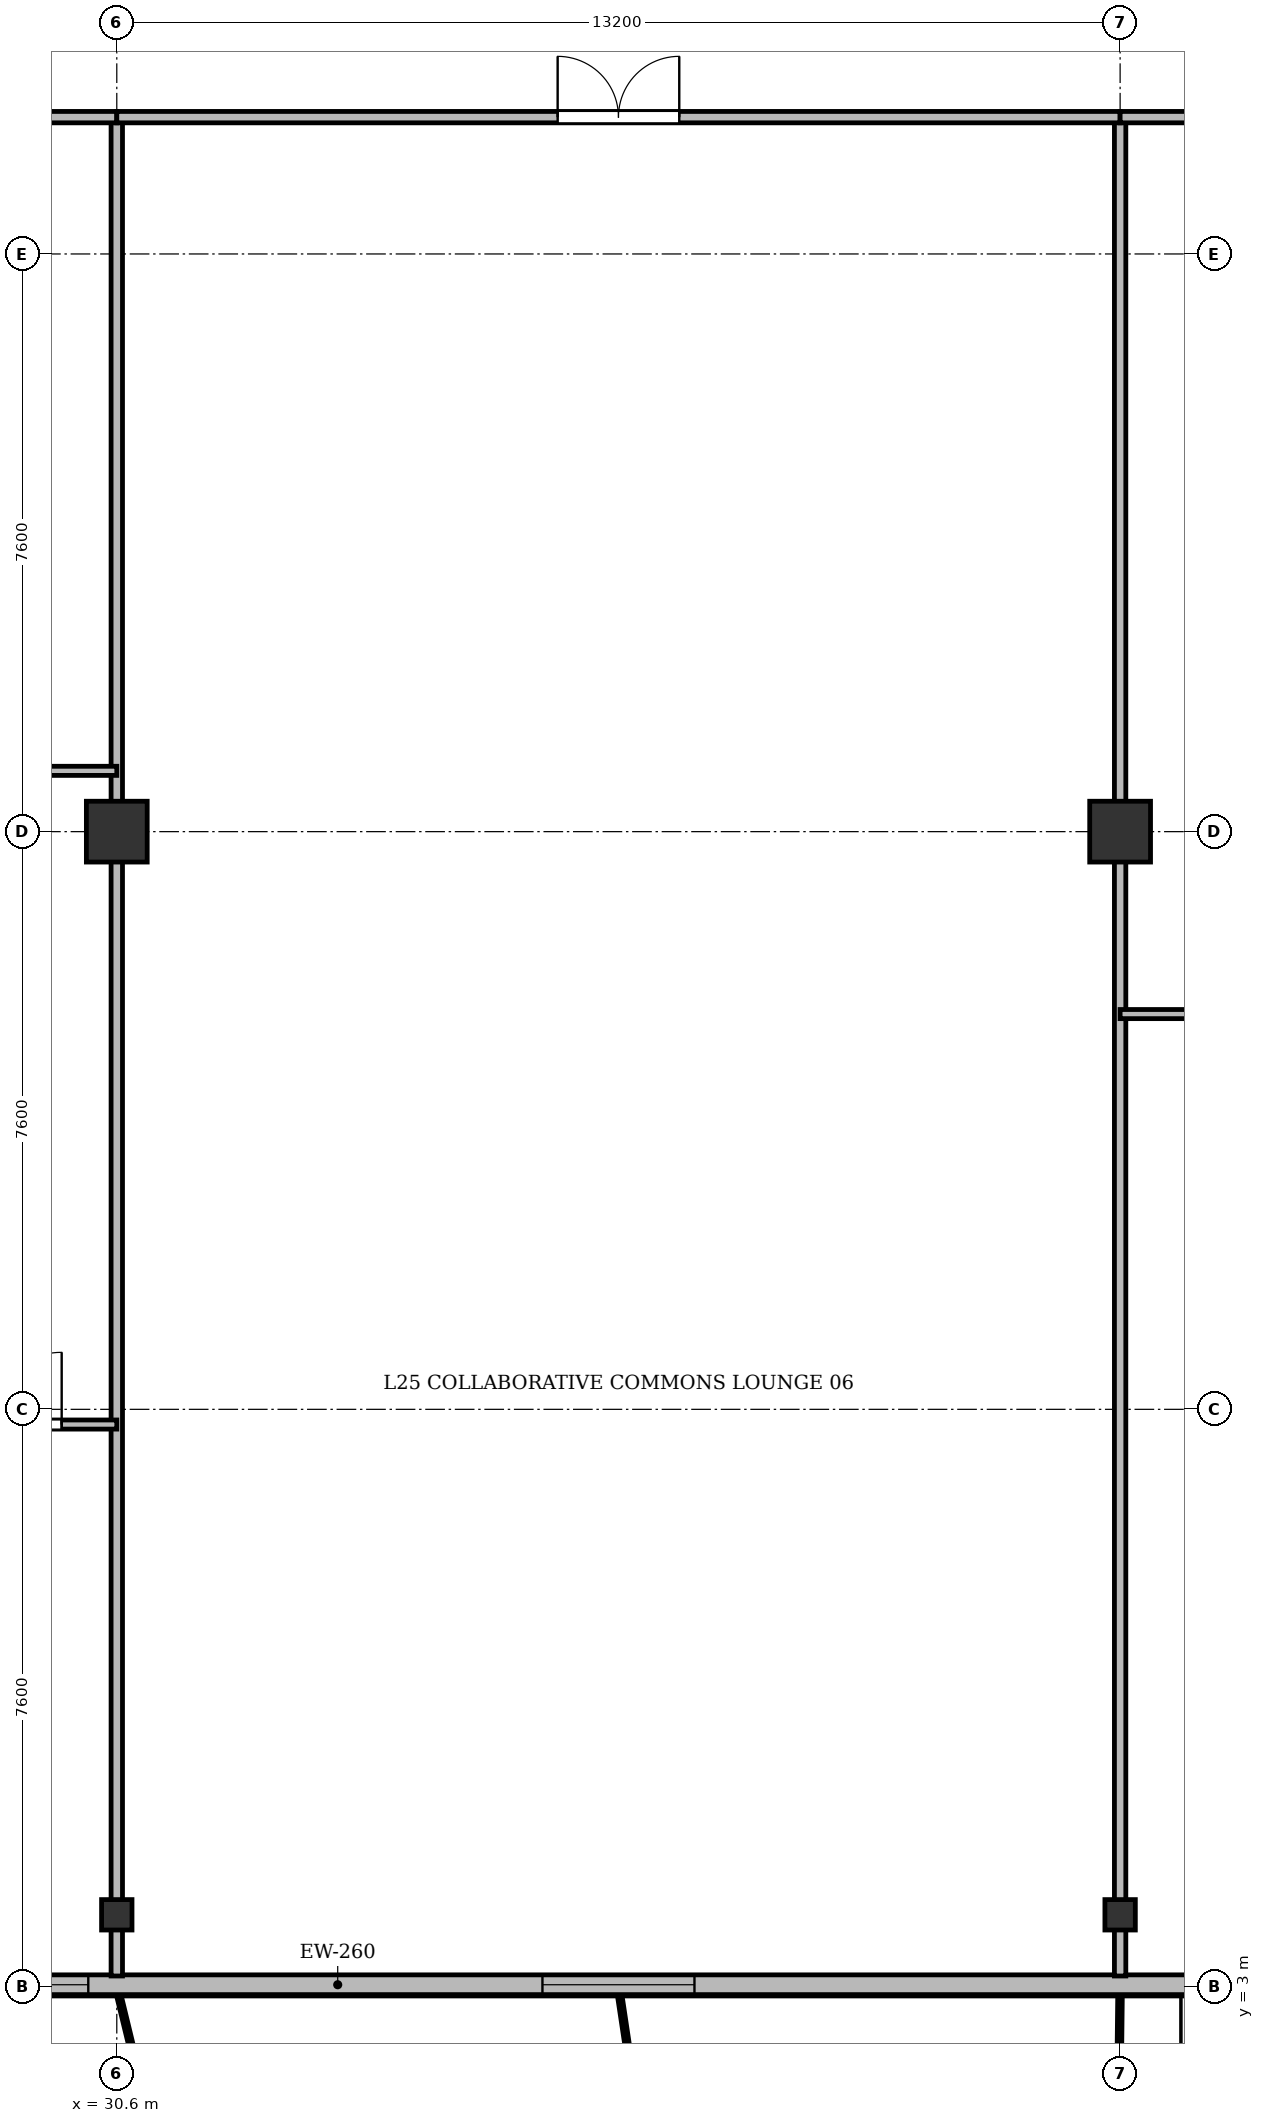
"""IFC4 building model, lengths in metres.
Left out: names, types, materials, properties, quantities, classifications, styles, units other than length and angle.
Written with IfcOpenShell. Run it as: python <this file> out.ifc"""

import sys

from ifc_helpers import new_model, si_unit, direction, frame, frame_2d, origin, origin_2d, place, context, subcontext, project, spatial, rectangle, i_section, extrude, source, transform, mapped, element, fill, save


model = new_model("IFC4")
c1 = context("Model", 3, precision=1e-05, world=origin(), true_north=direction((0.0, 1.0)))
c2 = subcontext(c1, "Body", "Model", "MODEL_VIEW")
j1 = project(units=[si_unit("LENGTHUNIT", "METRE"), si_unit("PLANEANGLEUNIT", "RADIAN")], contexts=[c1])
p1 = place(None, origin())
s1 = spatial("IfcSite", under=j1, at=p1, CompositionType="ELEMENT")
p2 = place(p1, origin())
s2 = spatial("IfcBuilding", under=s1, at=p2, CompositionType="ELEMENT")
p3 = place(p2, frame((0.0, 0.0, 99.7)))
s3 = spatial("IfcBuildingStorey", under=s2, at=p3, CompositionType="ELEMENT", Elevation=99.7)
m1 = source(origin(), c2, "Body", "SweptSolid", [
    extrude(i_section(OverallWidth=0.4, OverallDepth=0.4, WebThickness=0.022, FlangeThickness=0.035, at=origin_2d()), origin(), (0.0, 0.0, 1.0), 3.6),
])
p4 = place(p3, frame((30.6, 3.95, 0.0), z_axis=(0.0, 0.0, 1.0), x_axis=(1.0, 0.0, 0.0)))
e1 = element("IfcColumn", 1, at=p4, inside=s3, PredefinedType="COLUMN", context=c2, shape_type="MappedRepresentation", body=[
    mapped(m1, transform((0.0, 0.0, 0.0), x_axis=(1.0, 0.0, 0.0), y_axis=(0.0, 1.0, 0.0), z_axis=(0.0, 0.0, 1.0), scale=1.0)),
])
m2 = source(origin(), c2, "Body", "SweptSolid", [
    extrude(rectangle(XDim=0.8, YDim=0.8, at=origin_2d()), origin(), (0.0, 0.0, 1.0), 3.6),
])
p5 = place(p3, frame((30.6, 18.2, 0.0), z_axis=(0.0, 0.0, 1.0), x_axis=(1.0, 0.0, 0.0)))
e2 = element("IfcColumn", 2, at=p5, inside=s3, PredefinedType="COLUMN", context=c2, shape_type="MappedRepresentation", body=[
    mapped(m2, transform((0.0, 0.0, 0.0), x_axis=(1.0, 0.0, 0.0), y_axis=(0.0, 1.0, 0.0), z_axis=(0.0, 0.0, 1.0), scale=1.0)),
])
p6 = place(p3, frame((43.8, 3.95, 0.0), z_axis=(0.0, 0.0, 1.0), x_axis=(1.0, 0.0, 0.0)))
e3 = element("IfcColumn", 3, at=p6, inside=s3, PredefinedType="COLUMN", context=c2, shape_type="MappedRepresentation", body=[
    mapped(m1, transform((0.0, 0.0, 0.0), x_axis=(1.0, 0.0, 0.0), y_axis=(0.0, 1.0, 0.0), z_axis=(0.0, 0.0, 1.0), scale=1.0)),
])
p7 = place(p3, frame((43.8, 18.2, 0.0), z_axis=(0.0, 0.0, 1.0), x_axis=(1.0, 0.0, 0.0)))
e4 = element("IfcColumn", 4, at=p7, inside=s3, PredefinedType="COLUMN", context=c2, shape_type="MappedRepresentation", body=[
    mapped(m2, transform((0.0, 0.0, 0.0), x_axis=(1.0, 0.0, 0.0), y_axis=(0.0, 1.0, 0.0), z_axis=(0.0, 0.0, 1.0), scale=1.0)),
])
p8 = place(p3, frame((66.9, 3.03, 0.0), z_axis=(0.0, 0.0, 1.0), x_axis=(-1.0, 0.0, 0.0)))
e5 = element("IfcWall", 5, at=p8, inside=s3, PredefinedType="SOLIDWALL", context=c2, shape_type="SweptSolid", body=[
    extrude(rectangle(XDim=59.4, YDim=0.26, at=frame_2d((29.7, 0.0))), origin(), (0.0, 0.0, 1.0), 3.34),
])
p9 = place(p8, frame((1.9, 0.0, 0.9)))
e6 = element("IfcOpeningElement", 6, at=p9, cuts=e5, PredefinedType="OPENING", context=c2, shape_type="SweptSolid", body=[
    extrude(rectangle(XDim=2.2, YDim=1.8, at=frame_2d((1.1, 0.9))), frame((0.0, 0.14, 0.0), z_axis=(0.0, -1.0, 0.0), x_axis=(1.0, 0.0, 0.0)), (0.0, 0.0, 1.0), 0.28),
])
p10 = place(p8, frame((5.65, 0.0, 0.9)))
e7 = element("IfcOpeningElement", 7, at=p10, cuts=e5, PredefinedType="OPENING", context=c2, shape_type="SweptSolid", body=[
    extrude(rectangle(XDim=1.5, YDim=1.75, at=frame_2d((0.75, 0.875))), frame((0.0, 0.14, 0.0), z_axis=(0.0, -1.0, 0.0), x_axis=(1.0, 0.0, 0.0)), (0.0, 0.0, 1.0), 0.28),
])
p11 = place(p8, frame((8.4, 0.0, 0.9)))
e8 = element("IfcOpeningElement", 8, at=p11, cuts=e5, PredefinedType="OPENING", context=c2, shape_type="SweptSolid", body=[
    extrude(rectangle(XDim=2.0, YDim=1.95, at=frame_2d((1.0, 0.975))), frame((0.0, 0.14, 0.0), z_axis=(0.0, -1.0, 0.0), x_axis=(1.0, 0.0, 0.0)), (0.0, 0.0, 1.0), 0.28),
])
p12 = place(p8, frame((11.175, 0.0, 0.9)))
e9 = element("IfcOpeningElement", 9, at=p12, cuts=e5, PredefinedType="OPENING", context=c2, shape_type="SweptSolid", body=[
    extrude(rectangle(XDim=1.65, YDim=1.85, at=frame_2d((0.825, 0.925))), frame((0.0, 0.14, 0.0), z_axis=(0.0, -1.0, 0.0), x_axis=(1.0, 0.0, 0.0)), (0.0, 0.0, 1.0), 0.28),
])
p13 = place(p8, frame((13.7, 0.0, 0.9)))
e10 = element("IfcOpeningElement", 10, at=p13, cuts=e5, PredefinedType="OPENING", context=c2, shape_type="SweptSolid", body=[
    extrude(rectangle(XDim=1.8, YDim=1.8, at=frame_2d((0.9, 0.9))), frame((0.0, 0.14, 0.0), z_axis=(0.0, -1.0, 0.0), x_axis=(1.0, 0.0, 0.0)), (0.0, 0.0, 1.0), 0.28),
])
p14 = place(p8, frame((16.5, 0.0, 0.9)))
e11 = element("IfcOpeningElement", 11, at=p14, cuts=e5, PredefinedType="OPENING", context=c2, shape_type="SweptSolid", body=[
    extrude(rectangle(XDim=2.2, YDim=1.8, at=frame_2d((1.1, 0.9))), frame((0.0, 0.14, 0.0), z_axis=(0.0, -1.0, 0.0), x_axis=(1.0, 0.0, 0.0)), (0.0, 0.0, 1.0), 0.28),
])
p15 = place(p8, frame((20.227, 0.0, 0.0)))
e12 = element("IfcOpeningElement", 12, at=p15, cuts=e5, PredefinedType="OPENING", context=c2, shape_type="SweptSolid", body=[
    extrude(rectangle(XDim=1.2, YDim=2.2, at=frame_2d((0.6, 1.1))), frame((0.0, 0.14, 0.0), z_axis=(0.0, -1.0, 0.0), x_axis=(1.0, 0.0, 0.0)), (0.0, 0.0, 1.0), 0.28),
])
p16 = place(p8, frame((28.7, 0.0, 0.9)))
e13 = element("IfcOpeningElement", 13, at=p16, cuts=e5, PredefinedType="OPENING", context=c2, shape_type="SweptSolid", body=[
    extrude(rectangle(XDim=2.0, YDim=1.95, at=frame_2d((1.0, 0.975))), frame((0.0, 0.14, 0.0), z_axis=(0.0, -1.0, 0.0), x_axis=(1.0, 0.0, 0.0)), (0.0, 0.0, 1.0), 0.28),
])
p17 = place(p8, frame((36.675, 0.0, 0.9)))
e14 = element("IfcOpeningElement", 14, at=p17, cuts=e5, PredefinedType="OPENING", context=c2, shape_type="SweptSolid", body=[
    extrude(rectangle(XDim=1.65, YDim=1.85, at=frame_2d((0.825, 0.925))), frame((0.0, 0.14, 0.0), z_axis=(0.0, -1.0, 0.0), x_axis=(1.0, 0.0, 0.0)), (0.0, 0.0, 1.0), 0.28),
])
p18 = place(p8, frame((39.0, 0.0, 0.9)))
e15 = element("IfcOpeningElement", 15, at=p18, cuts=e5, PredefinedType="OPENING", context=c2, shape_type="SweptSolid", body=[
    extrude(rectangle(XDim=1.8, YDim=1.8, at=frame_2d((0.9, 0.9))), frame((0.0, 0.14, 0.0), z_axis=(0.0, -1.0, 0.0), x_axis=(1.0, 0.0, 0.0)), (0.0, 0.0, 1.0), 0.28),
])
p19 = place(p8, frame((41.55, 0.0, 0.9)))
e16 = element("IfcOpeningElement", 16, at=p19, cuts=e5, PredefinedType="OPENING", context=c2, shape_type="SweptSolid", body=[
    extrude(rectangle(XDim=1.5, YDim=1.75, at=frame_2d((0.75, 0.875))), frame((0.0, 0.14, 0.0), z_axis=(0.0, -1.0, 0.0), x_axis=(1.0, 0.0, 0.0)), (0.0, 0.0, 1.0), 0.28),
])
p20 = place(p8, frame((45.36, 0.0, 0.0)))
e17 = element("IfcOpeningElement", 17, at=p20, cuts=e5, PredefinedType="OPENING", context=c2, shape_type="SweptSolid", body=[
    extrude(rectangle(XDim=1.2, YDim=2.2, at=frame_2d((0.6, 1.1))), frame((0.0, 0.14, 0.0), z_axis=(0.0, -1.0, 0.0), x_axis=(1.0, 0.0, 0.0)), (0.0, 0.0, 1.0), 0.28),
])
p21 = place(p8, frame((48.3, 0.0, 0.9)))
e18 = element("IfcOpeningElement", 18, at=p21, cuts=e5, PredefinedType="OPENING", context=c2, shape_type="SweptSolid", body=[
    extrude(rectangle(XDim=2.0, YDim=1.95, at=frame_2d((1.0, 0.975))), frame((0.0, 0.14, 0.0), z_axis=(0.0, -1.0, 0.0), x_axis=(1.0, 0.0, 0.0)), (0.0, 0.0, 1.0), 0.28),
])
p22 = place(p8, frame((52.175, 0.0, 0.9)))
e19 = element("IfcOpeningElement", 19, at=p22, cuts=e5, PredefinedType="OPENING", context=c2, shape_type="SweptSolid", body=[
    extrude(rectangle(XDim=1.65, YDim=1.85, at=frame_2d((0.825, 0.925))), frame((0.0, 0.14, 0.0), z_axis=(0.0, -1.0, 0.0), x_axis=(1.0, 0.0, 0.0)), (0.0, 0.0, 1.0), 0.28),
])
p23 = place(p8, frame((55.5, 0.0, 0.9)))
e20 = element("IfcOpeningElement", 20, at=p23, cuts=e5, PredefinedType="OPENING", context=c2, shape_type="SweptSolid", body=[
    extrude(rectangle(XDim=1.8, YDim=1.8, at=frame_2d((0.9, 0.9))), frame((0.0, 0.14, 0.0), z_axis=(0.0, -1.0, 0.0), x_axis=(1.0, 0.0, 0.0)), (0.0, 0.0, 1.0), 0.28),
])
for number, where, z_axis, x_axis in (
    (21, (30.6, 3.145, 0.0), (0.0, 0.0, 1.0), (0.0, 1.0, 0.0)),
    (22, (43.8, 3.145, 0.0), (0.0, 0.0, 1.0), (0.0, 1.0, 0.0)),
):
    element("IfcWall", number, at=place(p3, frame(where, z_axis=z_axis, x_axis=x_axis)), inside=s3, PredefinedType="PARTITIONING", context=c2, shape_type="SweptSolid", body=[
        extrude(rectangle(XDim=24.455, YDim=0.15, at=frame_2d((12.228, 0.0))), origin(), (0.0, 0.0, 1.0), 2.84),
    ])
p24 = place(p3, frame((23.4, 19.0, 0.0), z_axis=(0.0, 0.0, 1.0), x_axis=(1.0, 0.0, 0.0)))
e23 = element("IfcWall", 23, at=p24, inside=s3, PredefinedType="PARTITIONING", context=c2, shape_type="SweptSolid", body=[
    extrude(rectangle(XDim=7.2, YDim=0.12, at=frame_2d((3.6, 0.0))), origin(), (0.0, 0.0, 1.0), 2.84),
])
p25 = place(p24, frame((3.125, 0.0, 0.0)))
e24 = element("IfcOpeningElement", 24, at=p25, cuts=e23, PredefinedType="OPENING", context=c2, shape_type="SweptSolid", body=[
    extrude(rectangle(XDim=0.95, YDim=2.15, at=frame_2d((0.475, 1.075))), frame((0.0, 0.07, 0.0), z_axis=(0.0, -1.0, 0.0), x_axis=(1.0, 0.0, 0.0)), (0.0, 0.0, 1.0), 0.14),
])
p26 = place(p3, frame((23.4, 27.6, 0.0), z_axis=(0.0, 0.0, 1.0), x_axis=(1.0, 0.0, 0.0)))
e25 = element("IfcWall", 25, at=p26, inside=s3, PredefinedType="PARTITIONING", context=c2, shape_type="SweptSolid", body=[
    extrude(rectangle(XDim=7.2, YDim=0.15, at=frame_2d((3.6, 0.0))), origin(), (0.0, 0.0, 1.0), 2.84),
])
p27 = place(p26, frame((4.706, 0.0, 0.0)))
e26 = element("IfcOpeningElement", 26, at=p27, cuts=e25, PredefinedType="OPENING", context=c2, shape_type="SweptSolid", body=[
    extrude(rectangle(XDim=0.95, YDim=2.15, at=frame_2d((0.475, 1.075))), frame((0.0, 0.085, 0.0), z_axis=(0.0, -1.0, 0.0), x_axis=(1.0, 0.0, 0.0)), (0.0, 0.0, 1.0), 0.17),
])
p28 = place(p3, frame((28.2, 10.4, 0.0), z_axis=(0.0, 0.0, 1.0), x_axis=(1.0, 0.0, 0.0)))
e27 = element("IfcWall", 27, at=p28, inside=s3, PredefinedType="PARTITIONING", context=c2, shape_type="SweptSolid", body=[
    extrude(rectangle(XDim=2.4, YDim=0.12, at=frame_2d((1.2, 0.0))), origin(), (0.0, 0.0, 1.0), 2.84),
])
p29 = place(p28, frame((0.725, 0.0, 0.0)))
e28 = element("IfcOpeningElement", 28, at=p29, cuts=e27, PredefinedType="OPENING", context=c2, shape_type="SweptSolid", body=[
    extrude(rectangle(XDim=0.95, YDim=2.15, at=frame_2d((0.475, 1.075))), frame((0.0, 0.07, 0.0), z_axis=(0.0, -1.0, 0.0), x_axis=(1.0, 0.0, 0.0)), (0.0, 0.0, 1.0), 0.14),
])
p30 = place(p3, frame((30.6, 27.6, 0.0), z_axis=(0.0, 0.0, 1.0), x_axis=(1.0, 0.0, 0.0)))
e29 = element("IfcWall", 29, at=p30, inside=s3, PredefinedType="PARTITIONING", context=c2, shape_type="SweptSolid", body=[
    extrude(rectangle(XDim=13.2, YDim=0.15, at=frame_2d((6.6, 0.0))), origin(), (0.0, 0.0, 1.0), 2.84),
])
p31 = place(p30, frame((5.8, 0.0, 0.0)))
e30 = element("IfcOpeningElement", 30, at=p31, cuts=e29, PredefinedType="OPENING", context=c2, shape_type="SweptSolid", body=[
    extrude(rectangle(XDim=1.6, YDim=2.2, at=frame_2d((0.8, 1.1))), frame((0.0, 0.085, 0.0), z_axis=(0.0, -1.0, 0.0), x_axis=(1.0, 0.0, 0.0)), (0.0, 0.0, 1.0), 0.17),
])
p32 = place(p3, frame((43.8, 27.6, 0.0), z_axis=(0.0, 0.0, 1.0), x_axis=(1.0, 0.0, 0.0)))
e31 = element("IfcWall", 31, at=p32, inside=s3, PredefinedType="PARTITIONING", context=c2, shape_type="SweptSolid", body=[
    extrude(rectangle(XDim=3.8, YDim=0.15, at=frame_2d((1.9, 0.0))), origin(), (0.0, 0.0, 1.0), 2.84),
])
p33 = place(p32, frame((1.33, 0.0, 0.0)))
e32 = element("IfcOpeningElement", 32, at=p33, cuts=e31, PredefinedType="OPENING", context=c2, shape_type="SweptSolid", body=[
    extrude(rectangle(XDim=0.95, YDim=2.15, at=frame_2d((0.475, 1.075))), frame((0.0, 0.085, 0.0), z_axis=(0.0, -1.0, 0.0), x_axis=(1.0, 0.0, 0.0)), (0.0, 0.0, 1.0), 0.17),
])
p34 = place(p3, frame((43.8, 15.8, 0.0), z_axis=(0.0, 0.0, 1.0), x_axis=(1.0, 0.0, 0.0)))
e33 = element("IfcWall", 33, at=p34, inside=s3, PredefinedType="PARTITIONING", context=c2, shape_type="SweptSolid", body=[
    extrude(rectangle(XDim=3.8, YDim=0.12, at=frame_2d((1.9, 0.0))), origin(), (0.0, 0.0, 1.0), 2.84),
])
p35 = place(p34, frame((1.33, 0.0, 0.0)))
e34 = element("IfcOpeningElement", 34, at=p35, cuts=e33, PredefinedType="OPENING", context=c2, shape_type="SweptSolid", body=[
    extrude(rectangle(XDim=0.95, YDim=2.15, at=frame_2d((0.475, 1.075))), frame((0.0, 0.07, 0.0), z_axis=(0.0, -1.0, 0.0), x_axis=(1.0, 0.0, 0.0)), (0.0, 0.0, 1.0), 0.14),
])
m3 = source(origin(), c2, "Body", "SweptSolid", [
    extrude(rectangle(XDim=2.0, YDim=1.95, at=frame_2d((1.0, 0.975))), frame((0.0, 0.03, 0.0), z_axis=(0.0, -1.0, 0.0), x_axis=(1.0, 0.0, 0.0)), (0.0, 0.0, 1.0), 0.06),
])
p36 = place(p16, origin())
e35 = element("IfcWindow", 35, at=p36, inside=s3, PartitioningType="SINGLE_PANEL", PredefinedType="WINDOW", context=c2, shape_type="MappedRepresentation", body=[
    mapped(m3, transform((0.0, 0.0, 0.0), x_axis=(1.0, 0.0, 0.0), y_axis=(0.0, 1.0, 0.0), z_axis=(0.0, 0.0, 1.0), scale=1.0)),
])
fill(e13, e35)
m4 = source(origin(), c2, "Body", "SweptSolid", [
    extrude(rectangle(XDim=1.65, YDim=1.85, at=frame_2d((0.825, 0.925))), frame((0.0, 0.03, 0.0), z_axis=(0.0, -1.0, 0.0), x_axis=(1.0, 0.0, 0.0)), (0.0, 0.0, 1.0), 0.06),
])
p37 = place(p17, origin())
e36 = element("IfcWindow", 36, at=p37, inside=s3, PartitioningType="SINGLE_PANEL", PredefinedType="WINDOW", context=c2, shape_type="MappedRepresentation", body=[
    mapped(m4, transform((0.0, 0.0, 0.0), x_axis=(1.0, 0.0, 0.0), y_axis=(0.0, 1.0, 0.0), z_axis=(0.0, 0.0, 1.0), scale=1.0)),
])
fill(e14, e36)
m5 = source(origin(), c2, "Body", "SweptSolid", [
    extrude(rectangle(XDim=0.95, YDim=2.15, at=frame_2d((0.475, 1.075))), frame((0.0, 0.025, 0.0), z_axis=(0.0, -1.0, 0.0), x_axis=(1.0, 0.0, 0.0)), (0.0, 0.0, 1.0), 0.05),
])
p38 = place(p29, origin())
e37 = element("IfcDoor", 37, at=p38, inside=s3, OperationType="SINGLE_SWING_RIGHT", PredefinedType="DOOR", context=c2, shape_type="MappedRepresentation", body=[
    mapped(m5, transform((0.0, 0.0, 0.0), x_axis=(1.0, 0.0, 0.0), y_axis=(0.0, 1.0, 0.0), z_axis=(0.0, 0.0, 1.0), scale=1.0)),
])
fill(e28, e37)
m6 = source(origin(), c2, "Body", "SweptSolid", [
    extrude(rectangle(XDim=1.6, YDim=2.2, at=frame_2d((0.8, 1.1))), frame((0.0, 0.025, 0.0), z_axis=(0.0, -1.0, 0.0), x_axis=(1.0, 0.0, 0.0)), (0.0, 0.0, 1.0), 0.05),
])
p39 = place(p31, origin())
e38 = element("IfcDoor", 38, at=p39, inside=s3, OperationType="DOUBLE_DOOR_SINGLE_SWING", PredefinedType="DOOR", context=c2, shape_type="MappedRepresentation", body=[
    mapped(m6, transform((0.0, 0.0, 0.0), x_axis=(1.0, 0.0, 0.0), y_axis=(0.0, 1.0, 0.0), z_axis=(0.0, 0.0, 1.0), scale=1.0)),
])
fill(e30, e38)
save(model, sys.argv[1])
